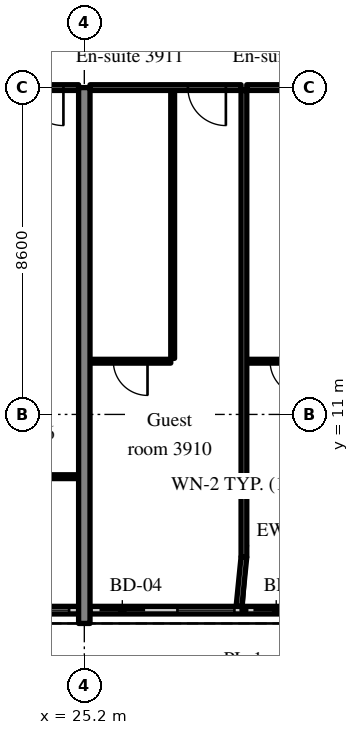
"""IFC4 building model, lengths in metres.
Left out: names, types, materials, properties, quantities, classifications, styles, units other than length and angle.
Written with IfcOpenShell. Run it as: python <this file> out.ifc"""

import sys

from ifc_helpers import new_model, si_unit, direction, frame, frame_2d, origin, place, context, subcontext, project, spatial, rectangle, extrude, source, transform, mapped, element, fill, save


model = new_model("IFC4")
c1 = context("Model", 3, precision=1e-05, world=origin(), true_north=direction((0.0, 1.0)))
c2 = subcontext(c1, "Body", "Model", "MODEL_VIEW")
j1 = project(units=[si_unit("LENGTHUNIT", "METRE"), si_unit("PLANEANGLEUNIT", "RADIAN")], contexts=[c1])
p1 = place(None, origin())
s1 = spatial("IfcSite", under=j1, at=p1, CompositionType="ELEMENT")
p2 = place(p1, origin())
s2 = spatial("IfcBuilding", under=s1, at=p2, CompositionType="ELEMENT")
p3 = place(p2, frame((0.0, 0.0, 163.0)))
s3 = spatial("IfcBuildingStorey", under=s2, at=p3, CompositionType="ELEMENT", Elevation=163.0)
m1 = source(origin(), c2, "Body", "SweptSolid", [
    extrude(rectangle(XDim=14.1, YDim=0.3, at=frame_2d((7.05, 0.0))), origin(), (0.0, 0.0, 1.0), 3.52),
])
p4 = place(p3, frame((25.2, 5.5, 0.0), z_axis=(0.0, 0.0, 1.0), x_axis=(0.0, 1.0, 0.0)))
e1 = element("IfcWall", 1, at=p4, inside=s3, PredefinedType="SHEAR", context=c2, shape_type="MappedRepresentation", body=[
    mapped(m1, transform((0.0, 0.0, 0.0), scale=1.0)),
])
m2 = source(origin(), c2, "Body", "SweptSolid", [
    extrude(rectangle(XDim=8.1, YDim=0.2, at=frame_2d((4.05, 0.0))), origin(), (0.0, 0.0, 1.0), 2.87),
])
p5 = place(p3, frame((16.95, 5.85, 0.0), z_axis=(0.0, 0.0, 1.0), x_axis=(1.0, 0.0, 0.0)))
e2 = element("IfcWall", 2, at=p5, inside=s3, PredefinedType="SOLIDWALL", context=c2, shape_type="MappedRepresentation", body=[
    mapped(m2, transform((0.0, 0.0, 0.0), scale=1.0)),
])
m3 = source(origin(), c2, "Body", "SweptSolid", [
    extrude(rectangle(XDim=1.2, YDim=2.4, at=frame_2d((0.6, 1.2))), frame((0.0, 0.11, 0.0), z_axis=(0.0, -1.0, 0.0), x_axis=(1.0, 0.0, 0.0)), (0.0, 0.0, 1.0), 0.22),
])
p6 = place(p5, frame((0.25, 0.0, 0.0)))
e3 = element("IfcOpeningElement", 3, at=p6, cuts=e2, PredefinedType="OPENING", context=c2, shape_type="MappedRepresentation", body=[
    mapped(m3, transform((0.0, 0.0, 0.0), scale=1.0)),
])
m4 = source(origin(), c2, "Body", "SweptSolid", [
    extrude(rectangle(XDim=1.5, YDim=1.5, at=frame_2d((0.75, 0.75))), frame((0.0, 0.11, 0.0), z_axis=(0.0, -1.0, 0.0), x_axis=(1.0, 0.0, 0.0)), (0.0, 0.0, 1.0), 0.22),
])
p7 = place(p5, frame((2.3, 0.0, 0.9)))
e4 = element("IfcOpeningElement", 4, at=p7, cuts=e2, PredefinedType="OPENING", context=c2, shape_type="MappedRepresentation", body=[
    mapped(m4, transform((0.0, 0.0, 0.0), scale=1.0)),
])
p8 = place(p5, frame((4.3, 0.0, 0.0)))
e5 = element("IfcOpeningElement", 5, at=p8, cuts=e2, PredefinedType="OPENING", context=c2, shape_type="MappedRepresentation", body=[
    mapped(m3, transform((0.0, 0.0, 0.0), scale=1.0)),
])
p9 = place(p5, frame((6.35, 0.0, 0.9)))
e6 = element("IfcOpeningElement", 6, at=p9, cuts=e2, PredefinedType="OPENING", context=c2, shape_type="MappedRepresentation", body=[
    mapped(m4, transform((0.0, 0.0, 0.0), scale=1.0)),
])
m5 = source(origin(), c2, "Body", "SweptSolid", [
    extrude(rectangle(XDim=8.1, YDim=0.2, at=frame_2d((4.05, 0.0))), origin(), (0.0, 0.0, 1.0), 2.87),
])
p10 = place(p3, frame((25.35, 5.85, 0.0), z_axis=(0.0, 0.0, 1.0), x_axis=(1.0, 0.0, 0.0)))
e7 = element("IfcWall", 7, at=p10, inside=s3, PredefinedType="SOLIDWALL", context=c2, shape_type="MappedRepresentation", body=[
    mapped(m5, transform((0.0, 0.0, 0.0), scale=1.0)),
])
p11 = place(p10, frame((0.25, 0.0, 0.0)))
e8 = element("IfcOpeningElement", 8, at=p11, cuts=e7, PredefinedType="OPENING", context=c2, shape_type="MappedRepresentation", body=[
    mapped(m3, transform((0.0, 0.0, 0.0), scale=1.0)),
])
p12 = place(p10, frame((2.3, 0.0, 0.9)))
e9 = element("IfcOpeningElement", 9, at=p12, cuts=e7, PredefinedType="OPENING", context=c2, shape_type="MappedRepresentation", body=[
    mapped(m4, transform((0.0, 0.0, 0.0), scale=1.0)),
])
p13 = place(p10, frame((4.3, 0.0, 0.0)))
e10 = element("IfcOpeningElement", 10, at=p13, cuts=e7, PredefinedType="OPENING", context=c2, shape_type="MappedRepresentation", body=[
    mapped(m3, transform((0.0, 0.0, 0.0), scale=1.0)),
])
p14 = place(p10, frame((6.35, 0.0, 0.9)))
e11 = element("IfcOpeningElement", 11, at=p14, cuts=e7, PredefinedType="OPENING", context=c2, shape_type="MappedRepresentation", body=[
    mapped(m4, transform((0.0, 0.0, 0.0), scale=1.0)),
])
m6 = source(origin(), c2, "Body", "SweptSolid", [
    extrude(rectangle(XDim=8.1, YDim=0.1, at=frame_2d((4.05, 0.0))), origin(), (0.0, 0.0, 1.0), 3.52),
])
p15 = place(p3, frame((16.95, 9.362, 0.0), z_axis=(0.0, 0.0, 1.0), x_axis=(1.0, 0.0, 0.0)))
e12 = element("IfcWall", 12, at=p15, inside=s3, PredefinedType="PARTITIONING", context=c2, shape_type="MappedRepresentation", body=[
    mapped(m6, transform((0.0, 0.0, 0.0), scale=1.0)),
])
m7 = source(origin(), c2, "Body", "SweptSolid", [
    extrude(rectangle(XDim=1.8, YDim=2.1, at=frame_2d((0.9, 1.05))), frame((0.0, 0.06, 0.0), z_axis=(0.0, -1.0, 0.0), x_axis=(1.0, 0.0, 0.0)), (0.0, 0.0, 1.0), 0.12),
])
p16 = place(p15, frame((3.15, 0.0, 0.0)))
e13 = element("IfcOpeningElement", 13, at=p16, cuts=e12, PredefinedType="OPENING", context=c2, shape_type="MappedRepresentation", body=[
    mapped(m7, transform((0.0, 0.0, 0.0), scale=1.0)),
])
m8 = source(origin(), c2, "Body", "SweptSolid", [
    extrude(rectangle(XDim=8.1, YDim=0.15, at=frame_2d((4.05, 0.0))), origin(), (0.0, 0.0, 1.0), 2.82),
])
p17 = place(p3, frame((16.95, 19.6, 0.0), z_axis=(0.0, 0.0, 1.0), x_axis=(1.0, 0.0, 0.0)))
e14 = element("IfcWall", 14, at=p17, inside=s3, PredefinedType="PARTITIONING", context=c2, shape_type="MappedRepresentation", body=[
    mapped(m8, transform((0.0, 0.0, 0.0), scale=1.0)),
])
m9 = source(origin(), c2, "Body", "SweptSolid", [
    extrude(rectangle(XDim=1.0, YDim=2.1, at=frame_2d((0.5, 1.05))), frame((0.0, 0.085, 0.0), z_axis=(0.0, -1.0, 0.0), x_axis=(1.0, 0.0, 0.0)), (0.0, 0.0, 1.0), 0.17),
])
p18 = place(p17, frame((6.7, 0.0, 0.0)))
e15 = element("IfcOpeningElement", 15, at=p18, cuts=e14, PredefinedType="OPENING", context=c2, shape_type="MappedRepresentation", body=[
    mapped(m9, transform((0.0, 0.0, 0.0), scale=1.0)),
])
m10 = source(origin(), c2, "Body", "SweptSolid", [
    extrude(rectangle(XDim=7.05, YDim=0.1, at=frame_2d((3.525, 0.0))), origin(), (0.0, 0.0, 1.0), 3.52),
])
p19 = place(p3, frame((27.525, 12.475, 0.0), z_axis=(0.0, 0.0, 1.0), x_axis=(0.0, 1.0, 0.0)))
e16 = element("IfcWall", 16, at=p19, inside=s3, PredefinedType="PARTITIONING", context=c2, shape_type="MappedRepresentation", body=[
    mapped(m10, transform((0.0, 0.0, 0.0), scale=1.0)),
])
m11 = source(origin(), c2, "Body", "SweptSolid", [
    extrude(rectangle(XDim=2.125, YDim=0.1, at=frame_2d((1.062, 0.0))), origin(), (0.0, 0.0, 1.0), 3.52),
])
p20 = place(p3, frame((25.35, 12.4, 0.0), z_axis=(0.0, 0.0, 1.0), x_axis=(1.0, 0.0, 0.0)))
e17 = element("IfcWall", 17, at=p20, inside=s3, PredefinedType="PARTITIONING", context=c2, shape_type="MappedRepresentation", body=[
    mapped(m11, transform((0.0, 0.0, 0.0), scale=1.0)),
])
m12 = source(origin(), c2, "Body", "SweptSolid", [
    extrude(rectangle(XDim=0.9, YDim=2.1, at=frame_2d((0.45, 1.05))), frame((0.0, 0.06, 0.0), z_axis=(0.0, -1.0, 0.0), x_axis=(1.0, 0.0, 0.0)), (0.0, 0.0, 1.0), 0.12),
])
p21 = place(p20, frame((0.613, 0.0, 0.0)))
e18 = element("IfcOpeningElement", 18, at=p21, cuts=e17, PredefinedType="OPENING", context=c2, shape_type="MappedRepresentation", body=[
    mapped(m12, transform((0.0, 0.0, 0.0), scale=1.0)),
])
m13 = source(origin(), c2, "Body", "SweptSolid", [
    extrude(rectangle(XDim=3.975, YDim=0.15, at=frame_2d((1.987, 0.0))), origin(), (0.0, 0.0, 1.0), 2.82),
])
p22 = place(p3, frame((25.35, 19.6, 0.0), z_axis=(0.0, 0.0, 1.0), x_axis=(1.0, 0.0, 0.0)))
e19 = element("IfcWall", 19, at=p22, inside=s3, PredefinedType="PARTITIONING", context=c2, shape_type="MappedRepresentation", body=[
    mapped(m13, transform((0.0, 0.0, 0.0), scale=1.0)),
])
p23 = place(p22, frame((2.575, 0.0, 0.0)))
e20 = element("IfcOpeningElement", 20, at=p23, cuts=e19, PredefinedType="OPENING", context=c2, shape_type="MappedRepresentation", body=[
    mapped(m9, transform((0.0, 0.0, 0.0), scale=1.0)),
])
p24 = place(p3, frame((29.475, 12.4, 0.0), z_axis=(0.0, 0.0, 1.0), x_axis=(1.0, 0.0, 0.0)))
e21 = element("IfcWall", 21, at=p24, inside=s3, PredefinedType="PARTITIONING", context=c2, shape_type="MappedRepresentation", body=[
    mapped(m11, transform((0.0, 0.0, 0.0), scale=1.0)),
])
p25 = place(p24, frame((0.613, 0.0, 0.0)))
e22 = element("IfcOpeningElement", 22, at=p25, cuts=e21, PredefinedType="OPENING", context=c2, shape_type="MappedRepresentation", body=[
    mapped(m12, transform((0.0, 0.0, 0.0), scale=1.0)),
])
p26 = place(p3, frame((29.475, 19.6, 0.0), z_axis=(0.0, 0.0, 1.0), x_axis=(1.0, 0.0, 0.0)))
e23 = element("IfcWall", 23, at=p26, inside=s3, PredefinedType="PARTITIONING", context=c2, shape_type="MappedRepresentation", body=[
    mapped(m13, transform((0.0, 0.0, 0.0), scale=1.0)),
])
p27 = place(p26, frame((2.575, 0.0, 0.0)))
e24 = element("IfcOpeningElement", 24, at=p27, cuts=e23, PredefinedType="OPENING", context=c2, shape_type="MappedRepresentation", body=[
    mapped(m9, transform((0.0, 0.0, 0.0), scale=1.0)),
])
m14 = source(origin(), c2, "Body", "SweptSolid", [
    extrude(rectangle(XDim=12.275, YDim=0.15, at=frame_2d((6.137, 0.0))), origin(), (0.0, 0.0, 1.0), 3.52),
])
p28 = place(p3, frame((29.4, 7.25, 0.0), z_axis=(0.0, 0.0, 1.0), x_axis=(0.0, 1.0, 0.0)))
e25 = element("IfcWall", 25, at=p28, inside=s3, PredefinedType="PARTITIONING", context=c2, shape_type="MappedRepresentation", body=[
    mapped(m14, transform((0.0, 0.0, 0.0), scale=1.0)),
])
m15 = source(origin(), c2, "Body", "SweptSolid", [
    extrude(rectangle(XDim=1.307, YDim=0.15, at=frame_2d((0.653, 0.0))), origin(), (0.0, 0.0, 1.0), 3.52),
])
p29 = place(p3, frame((29.27, 5.95, 0.0), z_axis=(0.0, 0.0, 1.0), x_axis=(0.099411212066, 0.995046436562, 0.0)))
e26 = element("IfcWall", 26, at=p29, inside=s3, PredefinedType="PARTITIONING", context=c2, shape_type="MappedRepresentation", body=[
    mapped(m15, transform((0.0, 0.0, 0.0), scale=1.0)),
])
m16 = source(origin(), c2, "Body", "SweptSolid", [
    extrude(rectangle(XDim=1.5, YDim=1.5, at=frame_2d((0.75, 0.75))), frame((0.0, 0.03, 0.0), z_axis=(0.0, -1.0, 0.0), x_axis=(1.0, 0.0, 0.0)), (0.0, 0.0, 1.0), 0.06),
])
p30 = place(p9, origin())
e27 = element("IfcWindow", 27, at=p30, inside=s3, PartitioningType="SINGLE_PANEL", PredefinedType="WINDOW", context=c2, shape_type="MappedRepresentation", body=[
    mapped(m16, transform((0.0, 0.0, 0.0), scale=1.0)),
])
fill(e6, e27)
m17 = source(origin(), c2, "Body", "SweptSolid", [
    extrude(rectangle(XDim=1.2, YDim=2.4, at=frame_2d((0.6, 1.2))), frame((0.0, 0.025, 0.0), z_axis=(0.0, -1.0, 0.0), x_axis=(1.0, 0.0, 0.0)), (0.0, 0.0, 1.0), 0.05),
])
p31 = place(p11, origin())
e28 = element("IfcDoor", 28, at=p31, inside=s3, OperationType="SLIDING_TO_RIGHT", PredefinedType="DOOR", context=c2, shape_type="MappedRepresentation", body=[
    mapped(m17, transform((0.0, 0.0, 0.0), scale=1.0)),
])
fill(e8, e28)
p32 = place(p12, origin())
e29 = element("IfcWindow", 29, at=p32, inside=s3, PartitioningType="SINGLE_PANEL", PredefinedType="WINDOW", context=c2, shape_type="MappedRepresentation", body=[
    mapped(m16, transform((0.0, 0.0, 0.0), scale=1.0)),
])
fill(e9, e29)
p33 = place(p13, origin())
e30 = element("IfcDoor", 30, at=p33, inside=s3, OperationType="SLIDING_TO_LEFT", PredefinedType="DOOR", context=c2, shape_type="MappedRepresentation", body=[
    mapped(m17, transform((0.0, 0.0, 0.0), scale=1.0)),
])
fill(e10, e30)
m18 = source(origin(), c2, "Body", "SweptSolid", [
    extrude(rectangle(XDim=1.0, YDim=2.1, at=frame_2d((0.5, 1.05))), frame((0.0, 0.025, 0.0), z_axis=(0.0, -1.0, 0.0), x_axis=(1.0, 0.0, 0.0)), (0.0, 0.0, 1.0), 0.05),
])
p34 = place(p18, origin())
e31 = element("IfcDoor", 31, at=p34, inside=s3, OperationType="SINGLE_SWING_RIGHT", PredefinedType="DOOR", context=c2, shape_type="MappedRepresentation", body=[
    mapped(m18, transform((0.0, 0.0, 0.0), scale=1.0)),
])
fill(e15, e31)
m19 = source(origin(), c2, "Body", "SweptSolid", [
    extrude(rectangle(XDim=0.9, YDim=2.1, at=frame_2d((0.45, 1.05))), frame((0.0, 0.025, 0.0), z_axis=(0.0, -1.0, 0.0), x_axis=(1.0, 0.0, 0.0)), (0.0, 0.0, 1.0), 0.05),
])
p35 = place(p21, origin())
e32 = element("IfcDoor", 32, at=p35, inside=s3, OperationType="SINGLE_SWING_RIGHT", PredefinedType="DOOR", context=c2, shape_type="MappedRepresentation", body=[
    mapped(m19, transform((0.0, 0.0, 0.0), scale=1.0)),
])
fill(e18, e32)
p36 = place(p23, origin())
e33 = element("IfcDoor", 33, at=p36, inside=s3, OperationType="SINGLE_SWING_RIGHT", PredefinedType="DOOR", context=c2, shape_type="MappedRepresentation", body=[
    mapped(m18, transform((0.0, 0.0, 0.0), scale=1.0)),
])
fill(e20, e33)
p37 = place(p25, origin())
e34 = element("IfcDoor", 34, at=p37, inside=s3, OperationType="SINGLE_SWING_RIGHT", PredefinedType="DOOR", context=c2, shape_type="MappedRepresentation", body=[
    mapped(m19, transform((0.0, 0.0, 0.0), scale=1.0)),
])
fill(e22, e34)
save(model, sys.argv[1])
